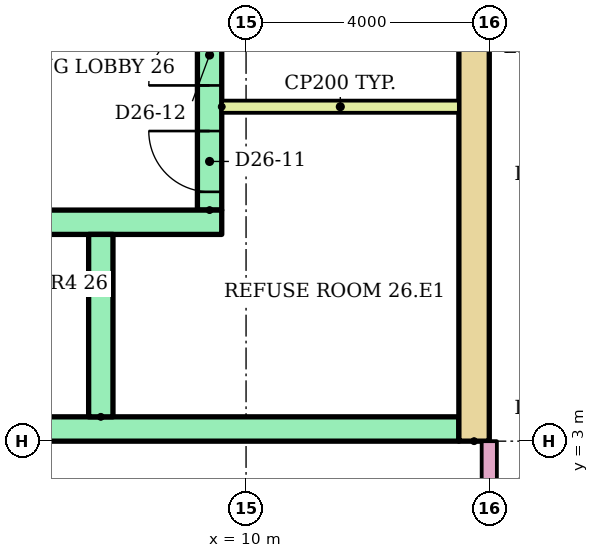
"""IFC4 building model, lengths in metres.
Left out: names, types, materials, properties, quantities, classifications, styles, units other than length and angle.
Written with IfcOpenShell. Run it as: python <this file> out.ifc"""

import sys

from ifc_helpers import new_model, si_unit, direction, frame, frame_2d, origin, place, context, subcontext, project, spatial, rectangle, extrude, element, fill, save


model = new_model("IFC4")
c1 = context("Model", 3, precision=1e-05, world=origin(), true_north=direction((0.0, 1.0)))
c2 = subcontext(c1, "Body", "Model", "MODEL_VIEW")
j1 = project(units=[si_unit("LENGTHUNIT", "METRE"), si_unit("PLANEANGLEUNIT", "RADIAN")], contexts=[c1])
p1 = place(None, origin())
s1 = spatial("IfcSite", under=j1, at=p1, CompositionType="ELEMENT")
p2 = place(p1, origin())
s2 = spatial("IfcBuilding", under=s1, at=p2, CompositionType="ELEMENT")
p3 = place(p2, frame((0.0, 0.0, 99.9)))
s3 = spatial("IfcBuildingStorey", under=s2, at=p3, CompositionType="ELEMENT", Elevation=99.9)
p4 = place(p3, frame((13.75, 3.0, 0.0), z_axis=(0.0, 0.0, 1.0), x_axis=(0.0, 1.0, 0.0)))
e1 = element("IfcWall", 1, at=p4, inside=s3, PredefinedType="SHEAR", context=c2, shape_type="SweptSolid", body=[
    extrude(rectangle(XDim=17.0, YDim=0.5, at=frame_2d((8.5, 0.0))), origin(), (0.0, 0.0, 1.0), 2.92),
])
p5 = place(p3, frame((9.4, 6.8, 0.0), z_axis=(0.0, 0.0, 1.0), x_axis=(0.0, 1.0, 0.0)))
e2 = element("IfcWall", 2, at=p5, inside=s3, PredefinedType="SHEAR", context=c2, shape_type="SweptSolid", body=[
    extrude(rectangle(XDim=12.7, YDim=0.4, at=frame_2d((6.35, 0.0))), origin(), (0.0, 0.0, 1.0), 2.92),
])
p6 = place(p5, frame((0.3, 0.0, 0.0)))
e3 = element("IfcOpeningElement", 3, at=p6, cuts=e2, PredefinedType="OPENING", context=c2, shape_type="SweptSolid", body=[
    extrude(rectangle(XDim=1.0, YDim=2.1, at=frame_2d((0.5, 1.05))), frame((0.0, 0.21, 0.0), z_axis=(0.0, -1.0, 0.0), x_axis=(1.0, 0.0, 0.0)), (0.0, 0.0, 1.0), 0.42),
])
p7 = place(p5, frame((2.05, 0.0, 0.0)))
e4 = element("IfcOpeningElement", 4, at=p7, cuts=e2, PredefinedType="OPENING", context=c2, shape_type="SweptSolid", body=[
    extrude(rectangle(XDim=1.0, YDim=2.1, at=frame_2d((0.5, 1.05))), frame((0.0, 0.21, 0.0), z_axis=(0.0, -1.0, 0.0), x_axis=(1.0, 0.0, 0.0)), (0.0, 0.0, 1.0), 0.42),
])
p8 = place(p5, frame((7.925, 0.0, 0.0)))
e5 = element("IfcOpeningElement", 5, at=p8, cuts=e2, PredefinedType="OPENING", context=c2, shape_type="SweptSolid", body=[
    extrude(rectangle(XDim=1.0, YDim=2.1, at=frame_2d((0.5, 1.05))), frame((0.0, 0.21, 0.0), z_axis=(0.0, -1.0, 0.0), x_axis=(1.0, 0.0, 0.0)), (0.0, 0.0, 1.0), 0.42),
])
p9 = place(p3, frame((-13.5, 3.2, 0.0)))
e6 = element("IfcWall", 6, at=p9, inside=s3, PredefinedType="SHEAR", context=c2, shape_type="SweptSolid", body=[
    extrude(rectangle(XDim=27.0, YDim=0.4, at=frame_2d((13.5, 0.0))), origin(), (0.0, 0.0, 1.0), 2.92),
])
p10 = place(p9, frame((6.861, 0.0, 0.0)))
e7 = element("IfcOpeningElement", 7, at=p10, cuts=e6, PredefinedType="OPENING", context=c2, shape_type="SweptSolid", body=[
    extrude(rectangle(XDim=1.1, YDim=2.1, at=frame_2d((0.55, 1.05))), frame((0.0, 0.21, 0.0), z_axis=(0.0, -1.0, 0.0), x_axis=(1.0, 0.0, 0.0)), (0.0, 0.0, 1.0), 0.42),
])
p11 = place(p9, frame((9.906, 0.0, 0.0)))
e8 = element("IfcOpeningElement", 8, at=p11, cuts=e6, PredefinedType="OPENING", context=c2, shape_type="SweptSolid", body=[
    extrude(rectangle(XDim=1.1, YDim=2.1, at=frame_2d((0.55, 1.05))), frame((0.0, 0.21, 0.0), z_axis=(0.0, -1.0, 0.0), x_axis=(1.0, 0.0, 0.0)), (0.0, 0.0, 1.0), 0.42),
])
p12 = place(p9, frame((15.994, 0.0, 0.0)))
e9 = element("IfcOpeningElement", 9, at=p12, cuts=e6, PredefinedType="OPENING", context=c2, shape_type="SweptSolid", body=[
    extrude(rectangle(XDim=1.1, YDim=2.1, at=frame_2d((0.55, 1.05))), frame((0.0, 0.21, 0.0), z_axis=(0.0, -1.0, 0.0), x_axis=(1.0, 0.0, 0.0)), (0.0, 0.0, 1.0), 0.42),
])
p13 = place(p9, frame((19.039, 0.0, 0.0)))
e10 = element("IfcOpeningElement", 10, at=p13, cuts=e6, PredefinedType="OPENING", context=c2, shape_type="SweptSolid", body=[
    extrude(rectangle(XDim=1.1, YDim=2.1, at=frame_2d((0.55, 1.05))), frame((0.0, 0.21, 0.0), z_axis=(0.0, -1.0, 0.0), x_axis=(1.0, 0.0, 0.0)), (0.0, 0.0, 1.0), 0.42),
])
p14 = place(p9, frame((12.6, 0.0, 0.0)))
e11 = element("IfcOpeningElement", 11, at=p14, cuts=e6, PredefinedType="OPENING", context=c2, shape_type="SweptSolid", body=[
    extrude(rectangle(XDim=1.8, YDim=2.1, at=frame_2d((0.9, 1.05))), frame((0.0, 0.21, 0.0), z_axis=(0.0, -1.0, 0.0), x_axis=(1.0, 0.0, 0.0)), (0.0, 0.0, 1.0), 0.42),
])
p15 = place(p3, frame((1.522, 6.6, 0.0)))
e12 = element("IfcWall", 12, at=p15, inside=s3, PredefinedType="SHEAR", context=c2, shape_type="SweptSolid", body=[
    extrude(rectangle(XDim=8.078, YDim=0.4, at=frame_2d((4.039, 0.0))), origin(), (0.0, 0.0, 1.0), 2.92),
])
p16 = place(p3, frame((7.611, 3.4, 0.0), z_axis=(0.0, 0.0, 1.0), x_axis=(0.0, 1.0, 0.0)))
e13 = element("IfcWall", 13, at=p16, inside=s3, PredefinedType="SHEAR", context=c2, shape_type="SweptSolid", body=[
    extrude(rectangle(XDim=3.0, YDim=0.4, at=frame_2d((1.5, 0.0))), origin(), (0.0, 0.0, 1.0), 2.92),
])
p17 = place(p3, frame((9.6, 8.5, 0.0)))
e14 = element("IfcWall", 14, at=p17, inside=s3, PredefinedType="PARTITIONING", context=c2, shape_type="SweptSolid", body=[
    extrude(rectangle(XDim=3.9, YDim=0.2, at=frame_2d((1.95, 0.0))), origin(), (0.0, 0.0, 1.0), 2.92),
])
p18 = place(p3, frame((14.0, 1.4, 0.0), z_axis=(0.0, 0.0, 1.0), x_axis=(0.0, 1.0, 0.0)))
e15 = element("IfcWall", 15, at=p18, inside=s3, PredefinedType="PARTITIONING", context=c2, shape_type="SweptSolid", body=[
    extrude(rectangle(XDim=1.6, YDim=0.25, at=frame_2d((0.8, 0.0))), origin(), (0.0, 0.0, 1.0), 2.4),
])
p19 = place(p6, origin())
e16 = element("IfcDoor", 16, at=p19, inside=s3, OperationType="SINGLE_SWING_RIGHT", PredefinedType="DOOR", context=c2, shape_type="SweptSolid", body=[
    extrude(rectangle(XDim=1.0, YDim=2.1, at=frame_2d((0.5, 1.05))), frame((0.0, 0.025, 0.0), z_axis=(0.0, -1.0, 0.0), x_axis=(1.0, 0.0, 0.0)), (0.0, 0.0, 1.0), 0.05),
])
fill(e3, e16)
p20 = place(p7, origin())
e17 = element("IfcDoor", 17, at=p20, inside=s3, OperationType="SINGLE_SWING_LEFT", PredefinedType="DOOR", context=c2, shape_type="SweptSolid", body=[
    extrude(rectangle(XDim=1.0, YDim=2.1, at=frame_2d((0.5, 1.05))), frame((0.0, 0.025, 0.0), z_axis=(0.0, -1.0, 0.0), x_axis=(1.0, 0.0, 0.0)), (0.0, 0.0, 1.0), 0.05),
])
fill(e4, e17)
save(model, sys.argv[1])
